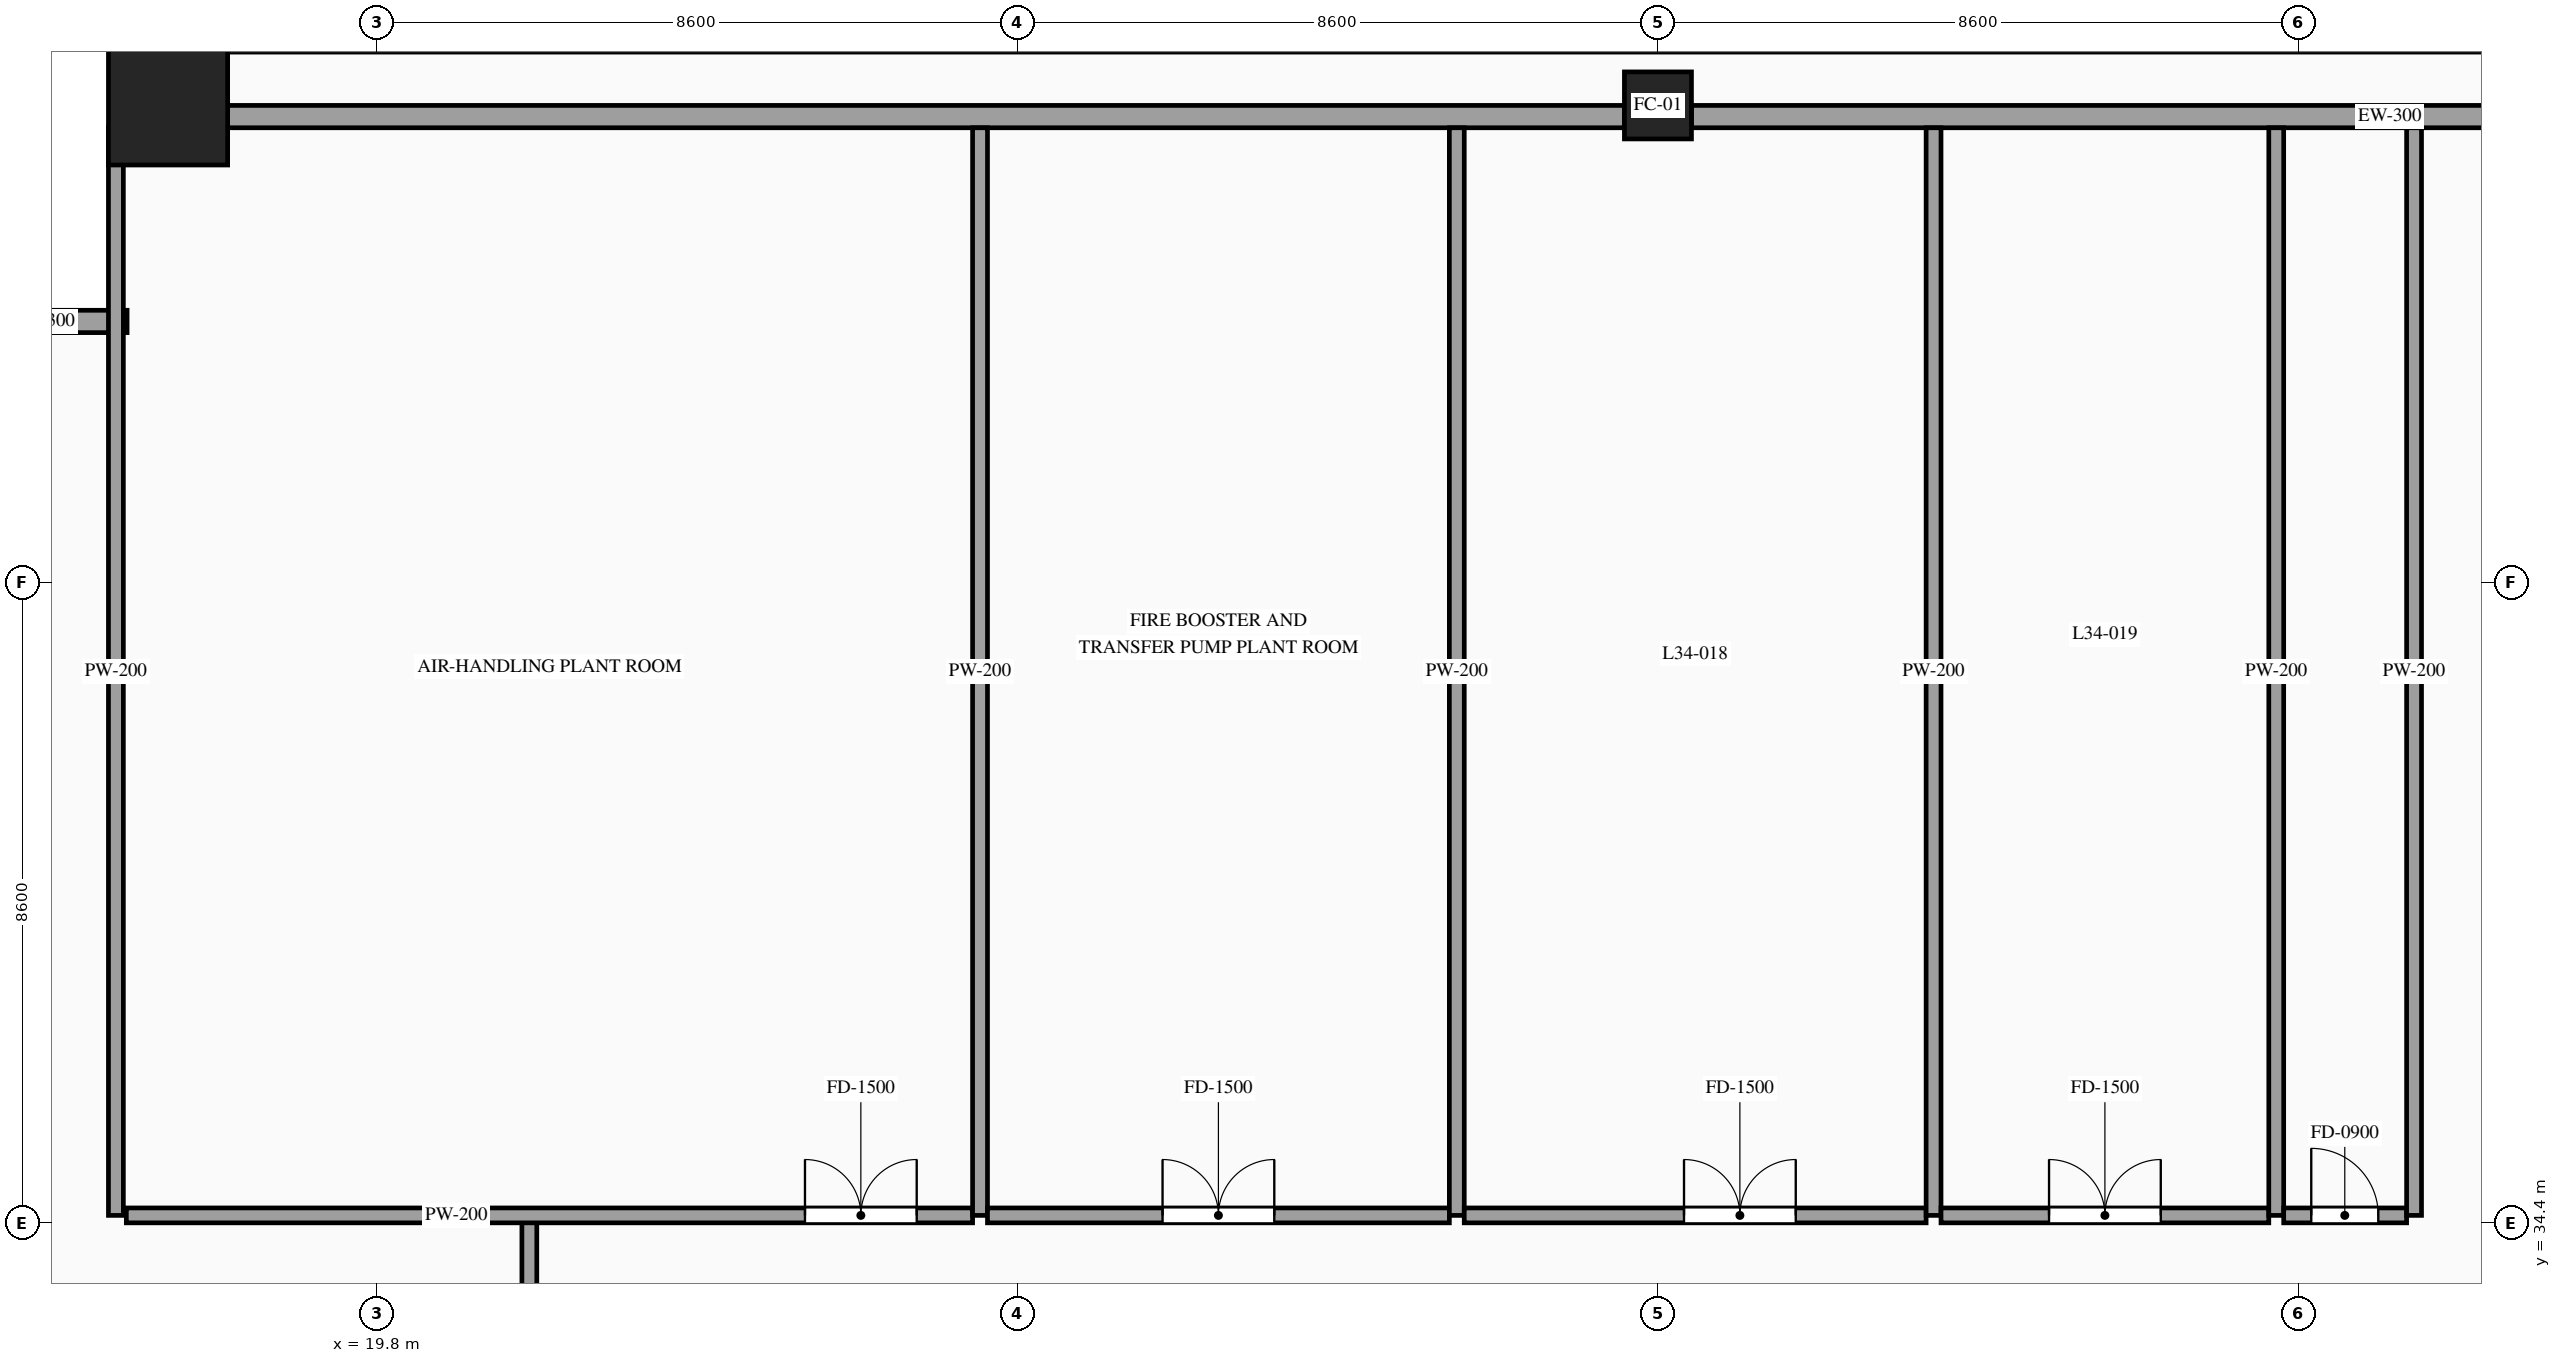
"""IFC4 building model, lengths in metres.
Left out: names, types, materials, properties, quantities, classifications, styles, units other than length and angle.
Written with IfcOpenShell. Run it as: python <this file> out.ifc"""

import sys

from ifc_helpers import new_model, si_unit, direction, frame, frame_2d, origin, origin_2d, place, context, subcontext, project, spatial, rectangle, hollow_rectangle, extrude, source, transform, mapped, element, fill, save


model = new_model("IFC4")
c1 = context("Model", 3, precision=1e-05, world=origin(), true_north=direction((0.0, 1.0)))
c2 = subcontext(c1, "Body", "Model", "MODEL_VIEW")
j1 = project(units=[si_unit("LENGTHUNIT", "METRE"), si_unit("PLANEANGLEUNIT", "RADIAN")], contexts=[c1])
p1 = place(None, origin())
s1 = spatial("IfcSite", under=j1, at=p1, CompositionType="ELEMENT")
p2 = place(p1, origin())
s2 = spatial("IfcBuilding", under=s1, at=p2, CompositionType="ELEMENT")
p3 = place(p2, frame((0.0, 0.0, 129.8)))
s3 = spatial("IfcBuildingStorey", under=s2, at=p3, CompositionType="ELEMENT", Elevation=129.8)
m1 = source(origin(), c2, "Body", "SweptSolid", [
    extrude(hollow_rectangle(XDim=1.6, YDim=1.6, WallThickness=0.07, at=origin_2d()), origin(), (0.0, 0.0, 1.0), 4.6),
])
p4 = place(p3, frame((17.0, 49.4, 0.0), z_axis=(0.0, 0.0, 1.0), x_axis=(1.0, 0.0, 0.0)))
e1 = element("IfcColumn", 1, at=p4, inside=s3, PredefinedType="COLUMN", context=c2, shape_type="MappedRepresentation", body=[
    mapped(m1, transform((0.0, 0.0, 0.0), scale=1.0)),
])
m2 = source(origin(), c2, "Body", "SweptSolid", [
    extrude(hollow_rectangle(XDim=0.9, YDim=0.9, WallThickness=0.042, at=origin_2d()), origin(), (0.0, 0.0, 1.0), 4.6),
])
p5 = place(p3, frame((37.0, 49.4, 0.0), z_axis=(0.0, 0.0, 1.0), x_axis=(1.0, 0.0, 0.0)))
e2 = element("IfcColumn", 2, at=p5, inside=s3, PredefinedType="COLUMN", context=c2, shape_type="MappedRepresentation", body=[
    mapped(m2, transform((0.0, 0.0, 0.0), scale=1.0)),
])
m3 = source(origin(), c2, "Body", "SweptSolid", [
    extrude(rectangle(XDim=2.25, YDim=0.3, at=frame_2d((1.125, 0.0))), origin(), (0.0, 0.0, 1.0), 4.38),
])
p6 = place(p3, frame((16.45, 46.5, 0.0), z_axis=(0.0, 0.0, 1.0), x_axis=(-1.0, 0.0, 0.0)))
e3 = element("IfcWall", 3, at=p6, inside=s3, PredefinedType="SOLIDWALL", context=c2, shape_type="MappedRepresentation", body=[
    mapped(m3, transform((0.0, 0.0, 0.0), scale=1.0)),
])
m4 = source(origin(), c2, "Body", "SweptSolid", [
    extrude(rectangle(XDim=18.75, YDim=0.3, at=frame_2d((9.375, 0.0))), origin(), (0.0, 0.0, 1.0), 3.775),
])
for number, where, z_axis, x_axis in (
    (4, (17.8, 49.25, 0.0), (0.0, 0.0, 1.0), (1.0, 0.0, 0.0)),
    (5, (37.45, 49.25, 0.0), (0.0, 0.0, 1.0), (1.0, 0.0, 0.0)),
):
    element("IfcWall", number, at=place(p3, frame(where, z_axis=z_axis, x_axis=x_axis)), inside=s3, PredefinedType="SOLIDWALL", context=c2, shape_type="MappedRepresentation", body=[
        mapped(m4, transform((0.0, 0.0, 0.0), scale=1.0)),
    ])
m5 = source(origin(), c2, "Body", "SweptSolid", [
    extrude(rectangle(XDim=14.6, YDim=0.2, at=frame_2d((7.3, 0.0))), origin(), (0.0, 0.0, 1.0), 4.38),
])
p7 = place(p3, frame((16.3, 34.5, 0.0), z_axis=(0.0, 0.0, 1.0), x_axis=(0.0, 1.0, 0.0)))
e6 = element("IfcWall", 6, at=p7, inside=s3, PredefinedType="PARTITIONING", context=c2, shape_type="MappedRepresentation", body=[
    mapped(m5, transform((0.0, 0.0, 0.0), scale=1.0)),
])
p8 = place(p3, frame((21.85, 28.1, 0.0), z_axis=(0.0, 0.0, 1.0), x_axis=(0.0, 1.0, 0.0)))
e7 = element("IfcWall", 7, at=p8, inside=s3, PredefinedType="PARTITIONING", context=c2, shape_type="SweptSolid", body=[
    extrude(rectangle(XDim=6.4, YDim=0.2, at=frame_2d((3.2, 0.0))), origin(), (0.0, 0.0, 1.0), 4.38),
])
p9 = place(p8, frame((0.7, 0.0, 0.0)))
e8 = element("IfcOpeningElement", 8, at=p9, cuts=e7, PredefinedType="OPENING", context=c2, shape_type="SweptSolid", body=[
    extrude(rectangle(XDim=1.0, YDim=2.2, at=frame_2d((0.5, 1.1))), frame((0.0, 0.115, 0.0), z_axis=(0.0, -1.0, 0.0), x_axis=(1.0, 0.0, 0.0)), (0.0, 0.0, 1.0), 0.23),
])
p10 = place(p3, frame((16.44, 34.5, 0.0), z_axis=(0.0, 0.0, 1.0), x_axis=(1.0, 0.0, 0.0)))
e9 = element("IfcWall", 9, at=p10, inside=s3, PredefinedType="PARTITIONING", context=c2, shape_type="SweptSolid", body=[
    extrude(rectangle(XDim=11.36, YDim=0.2, at=frame_2d((5.68, 0.0))), origin(), (0.0, 0.0, 1.0), 4.38),
])
p11 = place(p10, frame((9.11, 0.0, 0.0)))
e10 = element("IfcOpeningElement", 10, at=p11, cuts=e9, PredefinedType="OPENING", context=c2, shape_type="SweptSolid", body=[
    extrude(rectangle(XDim=1.5, YDim=2.3, at=frame_2d((0.75, 1.15))), frame((0.0, 0.115, 0.0), z_axis=(0.0, -1.0, 0.0), x_axis=(1.0, 0.0, 0.0)), (0.0, 0.0, 1.0), 0.23),
])
p12 = place(p3, frame((27.9, 34.5, 0.0), z_axis=(0.0, 0.0, 1.0), x_axis=(0.0, 1.0, 0.0)))
e11 = element("IfcWall", 11, at=p12, inside=s3, PredefinedType="PARTITIONING", context=c2, shape_type="MappedRepresentation", body=[
    mapped(m5, transform((0.0, 0.0, 0.0), scale=1.0)),
])
p13 = place(p3, frame((28.0, 34.5, 0.0), z_axis=(0.0, 0.0, 1.0), x_axis=(1.0, 0.0, 0.0)))
e12 = element("IfcWall", 12, at=p13, inside=s3, PredefinedType="PARTITIONING", context=c2, shape_type="SweptSolid", body=[
    extrude(rectangle(XDim=6.2, YDim=0.2, at=frame_2d((3.1, 0.0))), origin(), (0.0, 0.0, 1.0), 4.38),
])
p14 = place(p13, frame((2.35, 0.0, 0.0)))
e13 = element("IfcOpeningElement", 13, at=p14, cuts=e12, PredefinedType="OPENING", context=c2, shape_type="SweptSolid", body=[
    extrude(rectangle(XDim=1.5, YDim=2.3, at=frame_2d((0.75, 1.15))), frame((0.0, 0.115, 0.0), z_axis=(0.0, -1.0, 0.0), x_axis=(1.0, 0.0, 0.0)), (0.0, 0.0, 1.0), 0.23),
])
p15 = place(p3, frame((34.3, 34.5, 0.0), z_axis=(0.0, 0.0, 1.0), x_axis=(0.0, 1.0, 0.0)))
e14 = element("IfcWall", 14, at=p15, inside=s3, PredefinedType="PARTITIONING", context=c2, shape_type="MappedRepresentation", body=[
    mapped(m5, transform((0.0, 0.0, 0.0), scale=1.0)),
])
p16 = place(p3, frame((34.4, 34.5, 0.0), z_axis=(0.0, 0.0, 1.0), x_axis=(1.0, 0.0, 0.0)))
e15 = element("IfcWall", 15, at=p16, inside=s3, PredefinedType="PARTITIONING", context=c2, shape_type="SweptSolid", body=[
    extrude(rectangle(XDim=6.2, YDim=0.2, at=frame_2d((3.1, 0.0))), origin(), (0.0, 0.0, 1.0), 4.38),
])
p17 = place(p16, frame((2.95, 0.0, 0.0)))
e16 = element("IfcOpeningElement", 16, at=p17, cuts=e15, PredefinedType="OPENING", context=c2, shape_type="SweptSolid", body=[
    extrude(rectangle(XDim=1.5, YDim=2.3, at=frame_2d((0.75, 1.15))), frame((0.0, 0.115, 0.0), z_axis=(0.0, -1.0, 0.0), x_axis=(1.0, 0.0, 0.0)), (0.0, 0.0, 1.0), 0.23),
])
p18 = place(p3, frame((40.7, 34.5, 0.0), z_axis=(0.0, 0.0, 1.0), x_axis=(0.0, 1.0, 0.0)))
e17 = element("IfcWall", 17, at=p18, inside=s3, PredefinedType="PARTITIONING", context=c2, shape_type="MappedRepresentation", body=[
    mapped(m5, transform((0.0, 0.0, 0.0), scale=1.0)),
])
p19 = place(p3, frame((40.8, 34.5, 0.0), z_axis=(0.0, 0.0, 1.0), x_axis=(1.0, 0.0, 0.0)))
e18 = element("IfcWall", 18, at=p19, inside=s3, PredefinedType="PARTITIONING", context=c2, shape_type="SweptSolid", body=[
    extrude(rectangle(XDim=4.4, YDim=0.2, at=frame_2d((2.2, 0.0))), origin(), (0.0, 0.0, 1.0), 4.38),
])
p20 = place(p19, frame((1.45, 0.0, 0.0)))
e19 = element("IfcOpeningElement", 19, at=p20, cuts=e18, PredefinedType="OPENING", context=c2, shape_type="SweptSolid", body=[
    extrude(rectangle(XDim=1.5, YDim=2.3, at=frame_2d((0.75, 1.15))), frame((0.0, 0.115, 0.0), z_axis=(0.0, -1.0, 0.0), x_axis=(1.0, 0.0, 0.0)), (0.0, 0.0, 1.0), 0.23),
])
p21 = place(p3, frame((45.3, 34.5, 0.0), z_axis=(0.0, 0.0, 1.0), x_axis=(0.0, 1.0, 0.0)))
e20 = element("IfcWall", 20, at=p21, inside=s3, PredefinedType="PARTITIONING", context=c2, shape_type="MappedRepresentation", body=[
    mapped(m5, transform((0.0, 0.0, 0.0), scale=1.0)),
])
p22 = place(p3, frame((45.4, 34.5, 0.0), z_axis=(0.0, 0.0, 1.0), x_axis=(1.0, 0.0, 0.0)))
e21 = element("IfcWall", 21, at=p22, inside=s3, PredefinedType="PARTITIONING", context=c2, shape_type="SweptSolid", body=[
    extrude(rectangle(XDim=1.65, YDim=0.2, at=frame_2d((0.825, 0.0))), origin(), (0.0, 0.0, 1.0), 4.38),
])
p23 = place(p22, frame((0.37, 0.0, 0.0)))
e22 = element("IfcOpeningElement", 22, at=p23, cuts=e21, PredefinedType="OPENING", context=c2, shape_type="SweptSolid", body=[
    extrude(rectangle(XDim=0.9, YDim=2.15, at=frame_2d((0.45, 1.075))), frame((0.0, 0.115, 0.0), z_axis=(0.0, -1.0, 0.0), x_axis=(1.0, 0.0, 0.0)), (0.0, 0.0, 1.0), 0.23),
])
p24 = place(p3, frame((47.15, 34.5, 0.0), z_axis=(0.0, 0.0, 1.0), x_axis=(0.0, 1.0, 0.0)))
e23 = element("IfcWall", 23, at=p24, inside=s3, PredefinedType="PARTITIONING", context=c2, shape_type="MappedRepresentation", body=[
    mapped(m5, transform((0.0, 0.0, 0.0), scale=1.0)),
])
m6 = source(origin(), c2, "Body", "SweptSolid", [
    extrude(rectangle(XDim=1.5, YDim=2.3, at=frame_2d((0.75, 1.15))), frame((0.0, 0.025, 0.0), z_axis=(0.0, -1.0, 0.0), x_axis=(1.0, 0.0, 0.0)), (0.0, 0.0, 1.0), 0.05),
])
p25 = place(p11, origin())
e24 = element("IfcDoor", 24, at=p25, inside=s3, OperationType="DOUBLE_DOOR_SINGLE_SWING", PredefinedType="DOOR", context=c2, shape_type="MappedRepresentation", body=[
    mapped(m6, transform((0.0, 0.0, 0.0), scale=1.0)),
])
fill(e10, e24)
p26 = place(p14, origin())
e25 = element("IfcDoor", 25, at=p26, inside=s3, OperationType="DOUBLE_DOOR_SINGLE_SWING", PredefinedType="DOOR", context=c2, shape_type="MappedRepresentation", body=[
    mapped(m6, transform((0.0, 0.0, 0.0), scale=1.0)),
])
fill(e13, e25)
p27 = place(p17, origin())
e26 = element("IfcDoor", 26, at=p27, inside=s3, OperationType="DOUBLE_DOOR_SINGLE_SWING", PredefinedType="DOOR", context=c2, shape_type="MappedRepresentation", body=[
    mapped(m6, transform((0.0, 0.0, 0.0), scale=1.0)),
])
fill(e16, e26)
p28 = place(p20, origin())
e27 = element("IfcDoor", 27, at=p28, inside=s3, OperationType="DOUBLE_DOOR_SINGLE_SWING", PredefinedType="DOOR", context=c2, shape_type="MappedRepresentation", body=[
    mapped(m6, transform((0.0, 0.0, 0.0), scale=1.0)),
])
fill(e19, e27)
m7 = source(origin(), c2, "Body", "SweptSolid", [
    extrude(rectangle(XDim=0.9, YDim=2.15, at=frame_2d((0.45, 1.075))), frame((0.0, 0.025, 0.0), z_axis=(0.0, -1.0, 0.0), x_axis=(1.0, 0.0, 0.0)), (0.0, 0.0, 1.0), 0.05),
])
p29 = place(p23, origin())
e28 = element("IfcDoor", 28, at=p29, inside=s3, OperationType="SINGLE_SWING_LEFT", PredefinedType="DOOR", context=c2, shape_type="MappedRepresentation", body=[
    mapped(m7, transform((0.0, 0.0, 0.0), scale=1.0)),
])
fill(e22, e28)
save(model, sys.argv[1])
